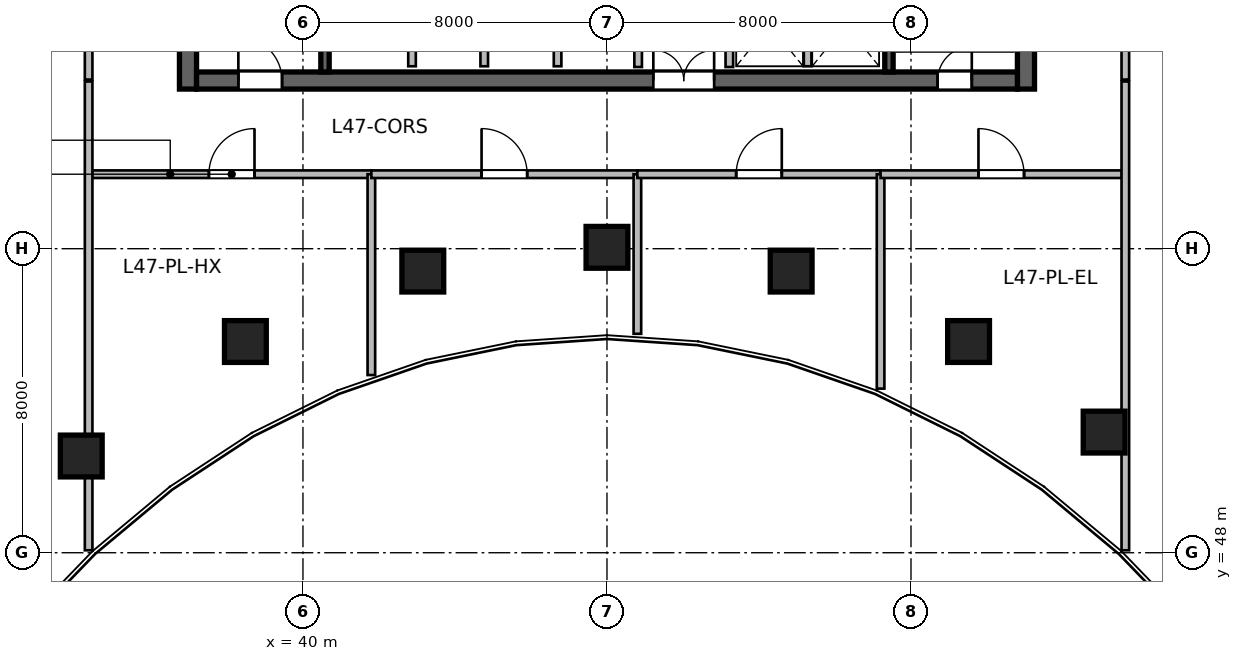
"""IFC4 building model, lengths in metres.
Left out: names, types, materials, properties, quantities, classifications, styles, units other than length and angle.
Written with IfcOpenShell. Run it as: python <this file> out.ifc"""

import sys

from ifc_helpers import new_model, si_unit, direction, frame, frame_2d, origin, origin_2d, place, context, subcontext, project, spatial, rectangle, circle, extrude, source, transform, mapped, element, fill, save


model = new_model("IFC4")
c1 = context("Model", 3, precision=1e-05, world=origin(), true_north=direction((0.0, 1.0)))
c2 = subcontext(c1, "Body", "Model", "MODEL_VIEW")
j1 = project(units=[si_unit("LENGTHUNIT", "METRE"), si_unit("PLANEANGLEUNIT", "RADIAN")], contexts=[c1])
p1 = place(None, origin())
s1 = spatial("IfcSite", under=j1, at=p1, CompositionType="ELEMENT")
p2 = place(p1, origin())
s2 = spatial("IfcBuilding", under=s1, at=p2, CompositionType="ELEMENT")
p3 = place(p2, frame((0.0, 0.0, 194.4)))
s3 = spatial("IfcBuildingStorey", under=s2, at=p3, CompositionType="ELEMENT", Elevation=194.4)
m1 = source(origin(), c2, "Body", "SweptSolid", [
    extrude(rectangle(XDim=12.0, YDim=0.45, at=frame_2d((6.0, 0.0))), origin(), (0.0, 0.0, 1.0), 4.8),
])
for number, where, z_axis, x_axis in (
    (1, (36.975, 60.2, 0.0), (0.0, 0.0, 1.0), (0.0, 1.0, 0.0)),
    (2, (59.025, 60.2, 0.0), (0.0, 0.0, 1.0), (0.0, 1.0, 0.0)),
):
    element("IfcWall", number, at=place(p3, frame(where, z_axis=z_axis, x_axis=x_axis)), inside=s3, PredefinedType="SHEAR", context=c2, shape_type="MappedRepresentation", body=[
        mapped(m1, transform((0.0, 0.0, 0.0), scale=1.0)),
    ])
m2 = source(origin(), c2, "Body", "SweptSolid", [
    extrude(rectangle(XDim=21.6, YDim=0.45, at=frame_2d((10.8, 0.0))), origin(), (0.0, 0.0, 1.0), 4.8),
])
p4 = place(p3, frame((37.2, 60.425, 0.0), z_axis=(0.0, 0.0, 1.0), x_axis=(1.0, 0.0, 0.0)))
e3 = element("IfcWall", 3, at=p4, inside=s3, PredefinedType="SHEAR", context=c2, shape_type="MappedRepresentation", body=[
    mapped(m2, transform((0.0, 0.0, 0.0), scale=1.0)),
])
p5 = place(p4, frame((1.1, 0.0, 0.0)))
e4 = element("IfcOpeningElement", 4, at=p5, cuts=e3, PredefinedType="OPENING", context=c2, shape_type="SweptSolid", body=[
    extrude(rectangle(XDim=1.15, YDim=2.15, at=frame_2d((0.575, 1.075))), frame((0.0, 0.235, 0.0), z_axis=(0.0, -1.0, 0.0), x_axis=(1.0, 0.0, 0.0)), (0.0, 0.0, 1.0), 0.47),
])
p6 = place(p4, frame((19.5, 0.0, 0.0)))
e5 = element("IfcOpeningElement", 5, at=p6, cuts=e3, PredefinedType="OPENING", context=c2, shape_type="SweptSolid", body=[
    extrude(rectangle(XDim=0.9, YDim=2.1, at=frame_2d((0.45, 1.05))), frame((0.0, 0.235, 0.0), z_axis=(0.0, -1.0, 0.0), x_axis=(1.0, 0.0, 0.0)), (0.0, 0.0, 1.0), 0.47),
])
p7 = place(p4, frame((12.02, 0.0, 0.0)))
e6 = element("IfcOpeningElement", 6, at=p7, cuts=e3, PredefinedType="OPENING", context=c2, shape_type="SweptSolid", body=[
    extrude(rectangle(XDim=1.6, YDim=2.15, at=frame_2d((0.8, 1.075))), frame((0.0, 0.235, 0.0), z_axis=(0.0, -1.0, 0.0), x_axis=(1.0, 0.0, 0.0)), (0.0, 0.0, 1.0), 0.47),
])
m3 = source(origin(), c2, "Body", "SweptSolid", [
    extrude(rectangle(XDim=11.1, YDim=0.22, at=frame_2d((5.55, 0.0))), origin(), (0.0, 0.0, 1.0), 4.8),
])
p8 = place(p3, frame((40.58, 60.65, 0.0), z_axis=(0.0, 0.0, 1.0), x_axis=(0.0, 1.0, 0.0)))
e7 = element("IfcWall", 7, at=p8, inside=s3, PredefinedType="SHEAR", context=c2, shape_type="MappedRepresentation", body=[
    mapped(m3, transform((0.0, 0.0, 0.0), scale=1.0)),
])
p9 = place(p3, frame((55.42, 60.65, 0.0), z_axis=(0.0, 0.0, 1.0), x_axis=(0.0, 1.0, 0.0)))
e8 = element("IfcWall", 8, at=p9, inside=s3, PredefinedType="SHEAR", context=c2, shape_type="MappedRepresentation", body=[
    mapped(m3, transform((0.0, 0.0, 0.0), scale=1.0)),
])
p10 = place(p9, frame((9.595, 0.0, 0.0)))
e9 = element("IfcOpeningElement", 9, at=p10, cuts=e8, PredefinedType="OPENING", context=c2, shape_type="SweptSolid", body=[
    extrude(rectangle(XDim=1.15, YDim=2.15, at=frame_2d((0.575, 1.075))), frame((0.0, 0.12, 0.0), z_axis=(0.0, -1.0, 0.0), x_axis=(1.0, 0.0, 0.0)), (0.0, 0.0, 1.0), 0.24),
])
m4 = source(origin(), c2, "Body", "SweptSolid", [
    extrude(circle(Radius=0.55, at=origin_2d()), origin(), (0.0, 0.0, 1.0), 4.8),
])
for number, where, z_axis, x_axis in (
    (10, (34.166, 50.545, 0.0), (0.0, 0.0, 1.0), (-0.436, 0.9, 0.0)),
    (11, (38.485, 53.558, 0.0), (0.0, 0.0, 1.0), (-0.289, 0.957, 0.0)),
    (12, (43.154, 55.411, 0.0), (0.0, 0.0, 1.0), (-0.143, 0.99, 0.0)),
    (13, (48.0, 56.036, 0.0), (0.0, 0.0, 1.0), (0.0, 1.0, 0.0)),
    (14, (52.846, 55.411, 0.0), (0.0, 0.0, 1.0), (0.143, 0.99, 0.0)),
    (15, (57.515, 53.558, 0.0), (0.0, 0.0, 1.0), (0.289, 0.957, 0.0)),
    (16, (61.082, 51.175, 0.0), (0.0, 0.0, 1.0), (0.409, 0.912, 0.0)),
):
    element("IfcColumn", number, at=place(p3, frame(where, z_axis=z_axis, x_axis=x_axis)), inside=s3, PredefinedType="COLUMN", context=c2, shape_type="MappedRepresentation", body=[
        mapped(m4, transform((0.0, 0.0, 0.0), scale=1.0)),
    ])
m5 = source(origin(), c2, "Body", "SweptSolid", [
    extrude(rectangle(XDim=2.24, YDim=0.2, at=frame_2d((1.12, 0.0))), origin(), (0.0, 0.0, 1.0), 4.54),
])
for number, where, z_axis, x_axis in (
    (17, (48.82, 60.78, 0.0), (0.0, 0.0, 1.0), (0.0, 1.0, 0.0)),
    (18, (51.22, 60.78, 0.0), (0.0, 0.0, 1.0), (0.0, 1.0, 0.0)),
):
    element("IfcWall", number, at=place(p3, frame(where, z_axis=z_axis, x_axis=x_axis)), inside=s3, PredefinedType="SOLIDWALL", context=c2, shape_type="MappedRepresentation", body=[
        mapped(m5, transform((0.0, 0.0, 0.0), scale=1.0)),
    ])
m6 = source(origin(), c2, "Body", "SweptSolid", [
    extrude(rectangle(XDim=2.2, YDim=0.2, at=frame_2d((1.1, 0.0))), origin(), (0.0, 0.0, 1.0), 4.54),
])
for number, where, z_axis, x_axis in (
    (19, (42.87, 60.8, 0.0), (0.0, 0.0, 1.0), (0.0, 1.0, 0.0)),
    (20, (44.77, 60.8, 0.0), (0.0, 0.0, 1.0), (0.0, 1.0, 0.0)),
    (21, (46.7, 60.8, 0.0), (0.0, 0.0, 1.0), (0.0, 1.0, 0.0)),
    (22, (53.28, 60.8, 0.0), (0.0, 0.0, 1.0), (0.0, 1.0, 0.0)),
):
    element("IfcWall", number, at=place(p3, frame(where, z_axis=z_axis, x_axis=x_axis)), inside=s3, PredefinedType="SOLIDWALL", context=c2, shape_type="MappedRepresentation", body=[
        mapped(m6, transform((0.0, 0.0, 0.0), scale=1.0)),
    ])
m7 = source(origin(), c2, "Body", "SweptSolid", [
    extrude(rectangle(XDim=7.35, YDim=0.2, at=frame_2d((3.675, 0.0))), origin(), (0.0, 0.0, 1.0), 3.985),
])
p11 = place(p3, frame((34.45, 57.96, 0.0), z_axis=(0.0, 0.0, 1.0), x_axis=(1.0, 0.0, 0.0)))
e23 = element("IfcWall", 23, at=p11, inside=s3, PredefinedType="SOLIDWALL", context=c2, shape_type="MappedRepresentation", body=[
    mapped(m7, transform((0.0, 0.0, 0.0), scale=1.0)),
])
p12 = place(p11, frame((3.075, 0.0, 0.0)))
e24 = element("IfcOpeningElement", 24, at=p12, cuts=e23, PredefinedType="OPENING", context=c2, shape_type="SweptSolid", body=[
    extrude(rectangle(XDim=1.2, YDim=2.15, at=frame_2d((0.6, 1.075))), frame((0.0, 0.11, 0.0), z_axis=(0.0, -1.0, 0.0), x_axis=(1.0, 0.0, 0.0)), (0.0, 0.0, 1.0), 0.22),
])
m8 = source(origin(), c2, "Body", "SweptSolid", [
    extrude(rectangle(XDim=5.285, YDim=0.2, at=frame_2d((2.643, 0.0))), origin(), (0.0, 0.0, 1.0), 4.54),
])
p13 = place(p3, frame((41.8, 52.675, 0.0), z_axis=(0.0, 0.0, 1.0), x_axis=(0.0, 1.0, 0.0)))
e25 = element("IfcWall", 25, at=p13, inside=s3, PredefinedType="SOLIDWALL", context=c2, shape_type="MappedRepresentation", body=[
    mapped(m8, transform((0.0, 0.0, 0.0), scale=1.0)),
])
m9 = source(origin(), c2, "Body", "SweptSolid", [
    extrude(rectangle(XDim=7.0, YDim=0.2, at=frame_2d((3.5, 0.0))), origin(), (0.0, 0.0, 1.0), 4.54),
])
p14 = place(p3, frame((41.8, 57.96, 0.0), z_axis=(0.0, 0.0, 1.0), x_axis=(1.0, 0.0, 0.0)))
e26 = element("IfcWall", 26, at=p14, inside=s3, PredefinedType="SOLIDWALL", context=c2, shape_type="MappedRepresentation", body=[
    mapped(m9, transform((0.0, 0.0, 0.0), scale=1.0)),
])
p15 = place(p14, frame((2.9, 0.0, 0.0)))
e27 = element("IfcOpeningElement", 27, at=p15, cuts=e26, PredefinedType="OPENING", context=c2, shape_type="SweptSolid", body=[
    extrude(rectangle(XDim=1.2, YDim=2.15, at=frame_2d((0.6, 1.075))), frame((0.0, 0.11, 0.0), z_axis=(0.0, -1.0, 0.0), x_axis=(1.0, 0.0, 0.0)), (0.0, 0.0, 1.0), 0.22),
])
m10 = source(origin(), c2, "Body", "SweptSolid", [
    extrude(rectangle(XDim=4.2, YDim=0.2, at=frame_2d((2.1, 0.0))), origin(), (0.0, 0.0, 1.0), 4.54),
])
p16 = place(p3, frame((48.8, 53.76, 0.0), z_axis=(0.0, 0.0, 1.0), x_axis=(0.0, 1.0, 0.0)))
e28 = element("IfcWall", 28, at=p16, inside=s3, PredefinedType="SOLIDWALL", context=c2, shape_type="MappedRepresentation", body=[
    mapped(m10, transform((0.0, 0.0, 0.0), scale=1.0)),
])
m11 = source(origin(), c2, "Body", "SweptSolid", [
    extrude(rectangle(XDim=6.4, YDim=0.2, at=frame_2d((3.2, 0.0))), origin(), (0.0, 0.0, 1.0), 3.985),
])
p17 = place(p3, frame((48.8, 57.96, 0.0), z_axis=(0.0, 0.0, 1.0), x_axis=(1.0, 0.0, 0.0)))
e29 = element("IfcWall", 29, at=p17, inside=s3, PredefinedType="SOLIDWALL", context=c2, shape_type="MappedRepresentation", body=[
    mapped(m11, transform((0.0, 0.0, 0.0), scale=1.0)),
])
p18 = place(p17, frame((2.6, 0.0, 0.0)))
e30 = element("IfcOpeningElement", 30, at=p18, cuts=e29, PredefinedType="OPENING", context=c2, shape_type="SweptSolid", body=[
    extrude(rectangle(XDim=1.2, YDim=2.15, at=frame_2d((0.6, 1.075))), frame((0.0, 0.11, 0.0), z_axis=(0.0, -1.0, 0.0), x_axis=(1.0, 0.0, 0.0)), (0.0, 0.0, 1.0), 0.22),
])
m12 = source(origin(), c2, "Body", "SweptSolid", [
    extrude(rectangle(XDim=5.642, YDim=0.2, at=frame_2d((2.821, 0.0))), origin(), (0.0, 0.0, 1.0), 4.54),
])
p19 = place(p3, frame((55.2, 52.318, 0.0), z_axis=(0.0, 0.0, 1.0), x_axis=(0.0, 1.0, 0.0)))
e31 = element("IfcWall", 31, at=p19, inside=s3, PredefinedType="SOLIDWALL", context=c2, shape_type="MappedRepresentation", body=[
    mapped(m12, transform((0.0, 0.0, 0.0), scale=1.0)),
])
m13 = source(origin(), c2, "Body", "SweptSolid", [
    extrude(rectangle(XDim=6.35, YDim=0.2, at=frame_2d((3.175, 0.0))), origin(), (0.0, 0.0, 1.0), 4.54),
])
p20 = place(p3, frame((55.2, 57.96, 0.0), z_axis=(0.0, 0.0, 1.0), x_axis=(1.0, 0.0, 0.0)))
e32 = element("IfcWall", 32, at=p20, inside=s3, PredefinedType="SOLIDWALL", context=c2, shape_type="MappedRepresentation", body=[
    mapped(m13, transform((0.0, 0.0, 0.0), scale=1.0)),
])
p21 = place(p20, frame((2.575, 0.0, 0.0)))
e33 = element("IfcOpeningElement", 33, at=p21, cuts=e32, PredefinedType="OPENING", context=c2, shape_type="SweptSolid", body=[
    extrude(rectangle(XDim=1.2, YDim=2.15, at=frame_2d((0.6, 1.075))), frame((0.0, 0.11, 0.0), z_axis=(0.0, -1.0, 0.0), x_axis=(1.0, 0.0, 0.0)), (0.0, 0.0, 1.0), 0.22),
])
m14 = source(origin(), c2, "Body", "SweptSolid", [
    extrude(rectangle(XDim=12.336, YDim=0.2, at=frame_2d((6.168, 0.0))), origin(), (0.0, 0.0, 1.0), 4.54),
])
p22 = place(p3, frame((34.36, 48.064, 0.0), z_axis=(0.0, 0.0, 1.0), x_axis=(0.0, 1.0, 0.0)))
e34 = element("IfcWall", 34, at=p22, inside=s3, PredefinedType="SOLIDWALL", context=c2, shape_type="MappedRepresentation", body=[
    mapped(m14, transform((0.0, 0.0, 0.0), scale=1.0)),
])
m15 = source(origin(), c2, "Body", "SweptSolid", [
    extrude(rectangle(XDim=5.05, YDim=0.2, at=frame_2d((2.525, 0.0))), origin(), (0.0, 0.0, 1.0), 4.54),
])
p23 = place(p3, frame((34.36, 60.45, 0.0), z_axis=(0.0, 0.0, 1.0), x_axis=(0.0, 1.0, 0.0)))
e35 = element("IfcWall", 35, at=p23, inside=s3, PredefinedType="SOLIDWALL", context=c2, shape_type="MappedRepresentation", body=[
    mapped(m15, transform((0.0, 0.0, 0.0), scale=1.0)),
])
p24 = place(p23, frame((1.925, 0.0, 0.0)))
e36 = element("IfcOpeningElement", 36, at=p24, cuts=e35, PredefinedType="OPENING", context=c2, shape_type="SweptSolid", body=[
    extrude(rectangle(XDim=1.2, YDim=2.15, at=frame_2d((0.6, 1.075))), frame((0.0, 0.11, 0.0), z_axis=(0.0, -1.0, 0.0), x_axis=(1.0, 0.0, 0.0)), (0.0, 0.0, 1.0), 0.22),
])
m16 = source(origin(), c2, "Body", "SweptSolid", [
    extrude(rectangle(XDim=12.336, YDim=0.2, at=frame_2d((6.168, 0.0))), origin(), (0.0, 0.0, 1.0), 3.898),
])
p25 = place(p3, frame((61.64, 48.064, 0.0), z_axis=(0.0, 0.0, 1.0), x_axis=(0.0, 1.0, 0.0)))
e37 = element("IfcWall", 37, at=p25, inside=s3, PredefinedType="SOLIDWALL", context=c2, shape_type="MappedRepresentation", body=[
    mapped(m16, transform((0.0, 0.0, 0.0), scale=1.0)),
])
p26 = place(p3, frame((61.64, 60.45, 0.0), z_axis=(0.0, 0.0, 1.0), x_axis=(0.0, 1.0, 0.0)))
e38 = element("IfcWall", 38, at=p26, inside=s3, PredefinedType="SOLIDWALL", context=c2, shape_type="MappedRepresentation", body=[
    mapped(m15, transform((0.0, 0.0, 0.0), scale=1.0)),
])
p27 = place(p26, frame((1.925, 0.0, 0.0)))
e39 = element("IfcOpeningElement", 39, at=p27, cuts=e38, PredefinedType="OPENING", context=c2, shape_type="SweptSolid", body=[
    extrude(rectangle(XDim=1.2, YDim=2.15, at=frame_2d((0.6, 1.075))), frame((0.0, 0.11, 0.0), z_axis=(0.0, -1.0, 0.0), x_axis=(1.0, 0.0, 0.0)), (0.0, 0.0, 1.0), 0.22),
])
m17 = source(origin(), c2, "Body", "SweptSolid", [
    extrude(rectangle(XDim=1.15, YDim=2.15, at=frame_2d((0.575, 1.075))), frame((0.0, 0.025, 0.0), z_axis=(0.0, -1.0, 0.0), x_axis=(1.0, 0.0, 0.0)), (0.0, 0.0, 1.0), 0.05),
])
p28 = place(p5, origin())
e40 = element("IfcDoor", 40, at=p28, inside=s3, OperationType="SINGLE_SWING_LEFT", PredefinedType="DOOR", context=c2, shape_type="MappedRepresentation", body=[
    mapped(m17, transform((0.0, 0.0, 0.0), scale=1.0)),
])
fill(e4, e40)
m18 = source(origin(), c2, "Body", "SweptSolid", [
    extrude(rectangle(XDim=0.9, YDim=2.1, at=frame_2d((0.45, 1.05))), frame((0.0, 0.025, 0.0), z_axis=(0.0, -1.0, 0.0), x_axis=(1.0, 0.0, 0.0)), (0.0, 0.0, 1.0), 0.05),
])
p29 = place(p6, origin())
e41 = element("IfcDoor", 41, at=p29, inside=s3, OperationType="SINGLE_SWING_RIGHT", PredefinedType="DOOR", context=c2, shape_type="MappedRepresentation", body=[
    mapped(m18, transform((0.0, 0.0, 0.0), scale=1.0)),
])
fill(e5, e41)
m19 = source(origin(), c2, "Body", "SweptSolid", [
    extrude(rectangle(XDim=1.6, YDim=2.15, at=frame_2d((0.8, 1.075))), frame((0.0, 0.025, 0.0), z_axis=(0.0, -1.0, 0.0), x_axis=(1.0, 0.0, 0.0)), (0.0, 0.0, 1.0), 0.05),
])
p30 = place(p7, origin())
e42 = element("IfcDoor", 42, at=p30, inside=s3, OperationType="DOUBLE_DOOR_SINGLE_SWING", PredefinedType="DOOR", context=c2, shape_type="MappedRepresentation", body=[
    mapped(m19, transform((0.0, 0.0, 0.0), scale=1.0)),
])
fill(e6, e42)
m20 = source(origin(), c2, "Body", "SweptSolid", [
    extrude(rectangle(XDim=1.2, YDim=2.15, at=frame_2d((0.6, 1.075))), frame((0.0, 0.025, 0.0), z_axis=(0.0, -1.0, 0.0), x_axis=(1.0, 0.0, 0.0)), (0.0, 0.0, 1.0), 0.05),
])
p31 = place(p12, origin())
e43 = element("IfcDoor", 43, at=p31, inside=s3, OperationType="SINGLE_SWING_RIGHT", PredefinedType="DOOR", context=c2, shape_type="MappedRepresentation", body=[
    mapped(m20, transform((0.0, 0.0, 0.0), scale=1.0)),
])
fill(e24, e43)
p32 = place(p15, origin())
e44 = element("IfcDoor", 44, at=p32, inside=s3, OperationType="SINGLE_SWING_LEFT", PredefinedType="DOOR", context=c2, shape_type="MappedRepresentation", body=[
    mapped(m20, transform((0.0, 0.0, 0.0), scale=1.0)),
])
fill(e27, e44)
p33 = place(p18, origin())
e45 = element("IfcDoor", 45, at=p33, inside=s3, OperationType="SINGLE_SWING_RIGHT", PredefinedType="DOOR", context=c2, shape_type="MappedRepresentation", body=[
    mapped(m20, transform((0.0, 0.0, 0.0), scale=1.0)),
])
fill(e30, e45)
p34 = place(p21, origin())
e46 = element("IfcDoor", 46, at=p34, inside=s3, OperationType="SINGLE_SWING_LEFT", PredefinedType="DOOR", context=c2, shape_type="MappedRepresentation", body=[
    mapped(m20, transform((0.0, 0.0, 0.0), scale=1.0)),
])
fill(e33, e46)
save(model, sys.argv[1])
